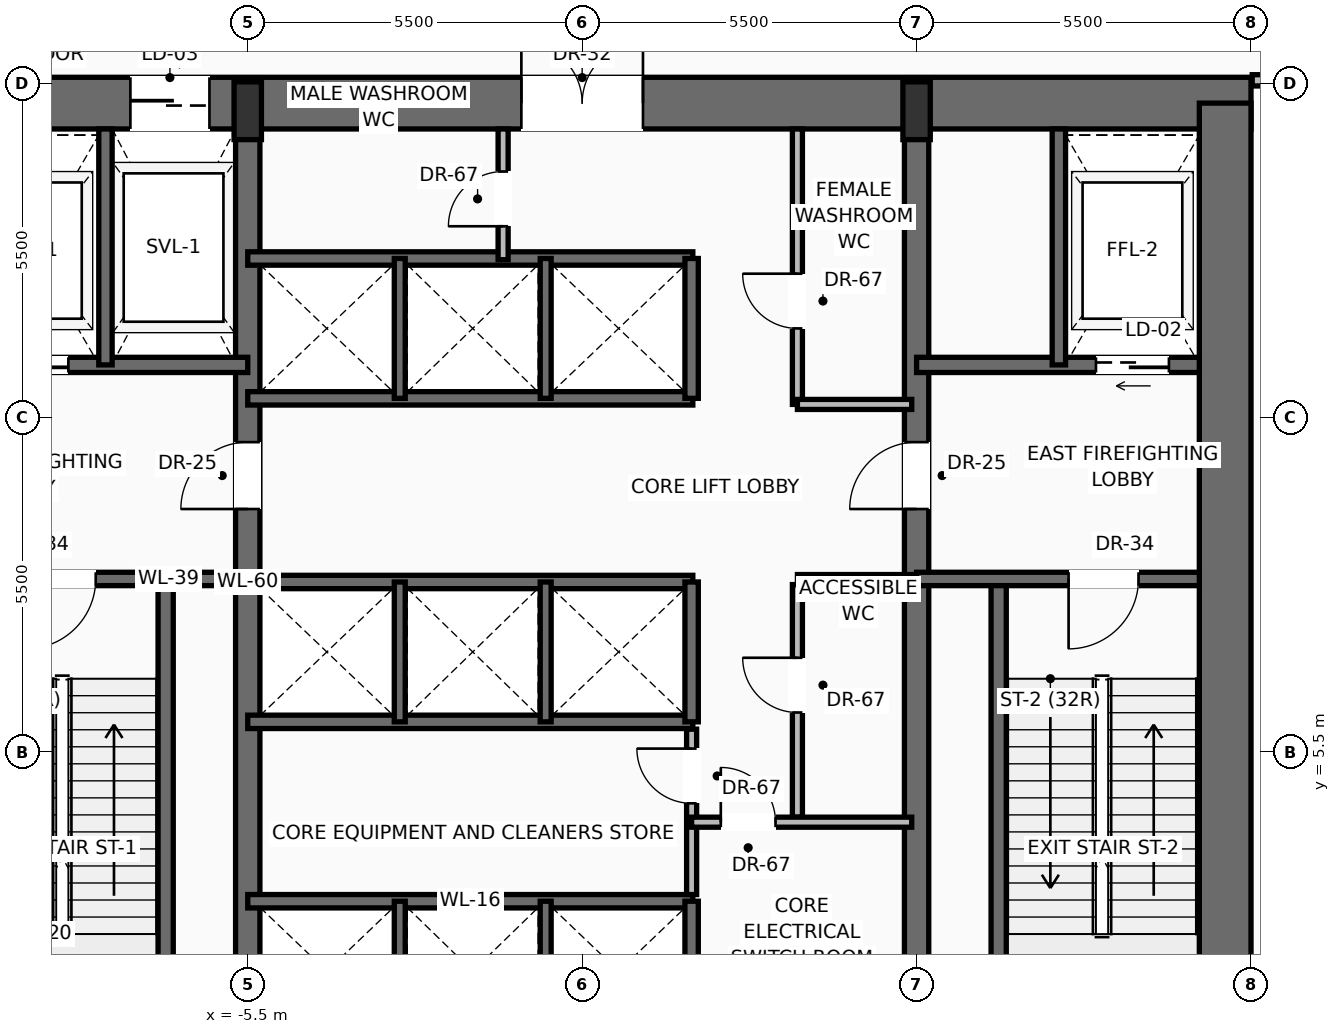
"""IFC4 building model, lengths in metres.
Left out: names, types, materials, properties, quantities, classifications, styles, units other than length and angle.
Written with IfcOpenShell. Run it as: python <this file> out.ifc"""

import sys

from ifc_helpers import new_model, si_unit, direction, frame, frame_2d, origin, origin_2d, place, context, subcontext, project, spatial, rectangle, extrude, source, transform, mapped, element, fill, save


model = new_model("IFC4")
c1 = context("Model", 3, precision=1e-05, world=origin(), true_north=direction((0.0, 1.0)))
c2 = subcontext(c1, "Body", "Model", "MODEL_VIEW")
j1 = project(units=[si_unit("LENGTHUNIT", "METRE"), si_unit("PLANEANGLEUNIT", "RADIAN")], contexts=[c1])
p1 = place(None, origin())
s1 = spatial("IfcSite", under=j1, at=p1, CompositionType="ELEMENT")
p2 = place(p1, origin())
s2 = spatial("IfcBuilding", under=s1, at=p2, CompositionType="ELEMENT")
p3 = place(p2, frame((0.0, 0.0, 16.5)))
s3 = spatial("IfcBuildingStorey", under=s2, at=p3, CompositionType="ELEMENT", Elevation=16.5)
p4 = place(p3, frame((-11.0, 16.175, 0.0), z_axis=(0.0, 0.0, 1.0), x_axis=(1.0, 0.0, 0.0)))
e1 = element("IfcWall", 1, at=p4, inside=s3, PredefinedType="SHEAR", context=c2, shape_type="SweptSolid", body=[
    extrude(rectangle(XDim=22.0, YDim=0.85, at=frame_2d((11.0, 0.0))), origin(), (0.0, 0.0, 1.0), 5.05),
])
p5 = place(p4, frame((3.57, 0.0, 0.0)))
e2 = element("IfcOpeningElement", 2, at=p5, cuts=e1, PredefinedType="OPENING", context=c2, shape_type="SweptSolid", body=[
    extrude(rectangle(XDim=1.3, YDim=2.3, at=frame_2d((0.65, 1.15))), frame((0.0, 0.435, 0.0), z_axis=(0.0, -1.0, 0.0), x_axis=(1.0, 0.0, 0.0)), (0.0, 0.0, 1.0), 0.87),
])
p6 = place(p4, frame((10.0, 0.0, 0.0)))
e3 = element("IfcOpeningElement", 3, at=p6, cuts=e1, PredefinedType="OPENING", context=c2, shape_type="SweptSolid", body=[
    extrude(rectangle(XDim=2.0, YDim=2.4, at=frame_2d((1.0, 1.2))), frame((0.0, 0.435, 0.0), z_axis=(0.0, -1.0, 0.0), x_axis=(1.0, 0.0, 0.0)), (0.0, 0.0, 1.0), 0.87),
])
p7 = place(p3, frame((10.575, 0.425, 0.0), z_axis=(0.0, 0.0, 1.0), x_axis=(0.0, 1.0, 0.0)))
e4 = element("IfcWall", 4, at=p7, inside=s3, PredefinedType="SHEAR", context=c2, shape_type="SweptSolid", body=[
    extrude(rectangle(XDim=15.75, YDim=0.85, at=frame_2d((7.875, 0.0))), origin(), (0.0, 0.0, 1.0), 5.05),
])
p8 = place(p3, frame((-5.5, 0.425, 0.0), z_axis=(0.0, 0.0, 1.0), x_axis=(0.0, 1.0, 0.0)))
e5 = element("IfcWall", 5, at=p8, inside=s3, PredefinedType="SHEAR", context=c2, shape_type="SweptSolid", body=[
    extrude(rectangle(XDim=15.75, YDim=0.4, at=frame_2d((7.875, 0.0))), origin(), (0.0, 0.0, 1.0), 5.05),
])
p9 = place(p8, frame((9.075, 0.0, 0.0)))
e6 = element("IfcOpeningElement", 6, at=p9, cuts=e5, PredefinedType="OPENING", context=c2, shape_type="SweptSolid", body=[
    extrude(rectangle(XDim=1.1, YDim=2.2, at=frame_2d((0.55, 1.1))), frame((0.0, 0.21, 0.0), z_axis=(0.0, -1.0, 0.0), x_axis=(1.0, 0.0, 0.0)), (0.0, 0.0, 1.0), 0.42),
])
p10 = place(p3, frame((5.5, 0.425, 0.0), z_axis=(0.0, 0.0, 1.0), x_axis=(0.0, 1.0, 0.0)))
e7 = element("IfcWall", 7, at=p10, inside=s3, PredefinedType="SHEAR", context=c2, shape_type="SweptSolid", body=[
    extrude(rectangle(XDim=15.75, YDim=0.4, at=frame_2d((7.875, 0.0))), origin(), (0.0, 0.0, 1.0), 5.05),
])
p11 = place(p10, frame((9.075, 0.0, 0.0)))
e8 = element("IfcOpeningElement", 8, at=p11, cuts=e7, PredefinedType="OPENING", context=c2, shape_type="SweptSolid", body=[
    extrude(rectangle(XDim=1.1, YDim=2.2, at=frame_2d((0.55, 1.1))), frame((0.0, 0.21, 0.0), z_axis=(0.0, -1.0, 0.0), x_axis=(1.0, 0.0, 0.0)), (0.0, 0.0, 1.0), 0.42),
])
m1 = source(origin(), c2, "Body", "SweptSolid", [
    extrude(rectangle(XDim=0.45, YDim=0.95, at=origin_2d()), origin(), (0.0, 0.0, 1.0), 5.5),
])
for number, where, z_axis, x_axis in (
    (9, (-5.5, 16.05, 0.0), (0.0, 0.0, 1.0), (1.0, 0.0, 0.0)),
    (10, (5.5, 16.05, 0.0), (0.0, 0.0, 1.0), (1.0, 0.0, 0.0)),
):
    element("IfcColumn", number, at=place(p3, frame(where, z_axis=z_axis, x_axis=x_axis)), inside=s3, PredefinedType="PILASTER", context=c2, shape_type="MappedRepresentation", body=[
        mapped(m1, transform((0.0, 0.0, 0.0), scale=1.0)),
    ])
p12 = place(p3, frame((-6.85, 0.85, 0.0), z_axis=(0.0, 0.0, 1.0), x_axis=(0.0, 1.0, 0.0)))
e11 = element("IfcWall", 11, at=p12, inside=s3, PredefinedType="SOLIDWALL", context=c2, shape_type="SweptSolid", body=[
    extrude(rectangle(XDim=7.5, YDim=0.25, at=frame_2d((3.75, 0.0))), origin(), (0.0, 0.0, 1.0), 5.05),
])
p13 = place(p3, frame((-5.5, 8.35, 0.0), z_axis=(0.0, 0.0, 1.0), x_axis=(-1.0, 0.0, 0.0)))
e12 = element("IfcWall", 12, at=p13, inside=s3, PredefinedType="SOLIDWALL", context=c2, shape_type="SweptSolid", body=[
    extrude(rectangle(XDim=4.65, YDim=0.22, at=frame_2d((2.325, 0.0))), origin(), (0.0, 0.0, 1.0), 5.05),
])
p14 = place(p13, frame((2.5, 0.0, 0.0)))
e13 = element("IfcOpeningElement", 13, at=p14, cuts=e12, PredefinedType="OPENING", context=c2, shape_type="SweptSolid", body=[
    extrude(rectangle(XDim=1.15, YDim=2.2, at=frame_2d((0.575, 1.1))), frame((0.0, 0.12, 0.0), z_axis=(0.0, -1.0, 0.0), x_axis=(1.0, 0.0, 0.0)), (0.0, 0.0, 1.0), 0.24),
])
p15 = place(p3, frame((-5.5, 11.87, 0.0), z_axis=(0.0, 0.0, 1.0), x_axis=(-1.0, 0.0, 0.0)))
e14 = element("IfcWall", 14, at=p15, inside=s3, PredefinedType="SOLIDWALL", context=c2, shape_type="SweptSolid", body=[
    extrude(rectangle(XDim=4.65, YDim=0.25, at=frame_2d((2.325, 0.0))), origin(), (0.0, 0.0, 1.0), 5.05),
])
p16 = place(p15, frame((2.95, 0.0, 0.0)))
e15 = element("IfcOpeningElement", 15, at=p16, cuts=e14, PredefinedType="OPENING", context=c2, shape_type="SweptSolid", body=[
    extrude(rectangle(XDim=1.2, YDim=2.25, at=frame_2d((0.6, 1.125))), frame((0.0, 0.135, 0.0), z_axis=(0.0, -1.0, 0.0), x_axis=(1.0, 0.0, 0.0)), (0.0, 0.0, 1.0), 0.27),
])
p17 = place(p3, frame((-7.84, 11.87, 0.0), z_axis=(0.0, 0.0, 1.0), x_axis=(0.0, 1.0, 0.0)))
e16 = element("IfcWall", 16, at=p17, inside=s3, PredefinedType="SOLIDWALL", context=c2, shape_type="SweptSolid", body=[
    extrude(rectangle(XDim=3.88, YDim=0.22, at=frame_2d((1.94, 0.0))), origin(), (0.0, 0.0, 1.0), 5.05),
])
p18 = place(p3, frame((6.85, 0.85, 0.0), z_axis=(0.0, 0.0, 1.0), x_axis=(0.0, 1.0, 0.0)))
e17 = element("IfcWall", 17, at=p18, inside=s3, PredefinedType="SOLIDWALL", context=c2, shape_type="SweptSolid", body=[
    extrude(rectangle(XDim=7.5, YDim=0.25, at=frame_2d((3.75, 0.0))), origin(), (0.0, 0.0, 1.0), 5.05),
])
p19 = place(p3, frame((10.15, 8.35, 0.0), z_axis=(0.0, 0.0, 1.0), x_axis=(-1.0, 0.0, 0.0)))
e18 = element("IfcWall", 18, at=p19, inside=s3, PredefinedType="SOLIDWALL", context=c2, shape_type="SweptSolid", body=[
    extrude(rectangle(XDim=4.65, YDim=0.22, at=frame_2d((2.325, 0.0))), origin(), (0.0, 0.0, 1.0), 5.05),
])
p20 = place(p19, frame((1.0, 0.0, 0.0)))
e19 = element("IfcOpeningElement", 19, at=p20, cuts=e18, PredefinedType="OPENING", context=c2, shape_type="SweptSolid", body=[
    extrude(rectangle(XDim=1.15, YDim=2.2, at=frame_2d((0.575, 1.1))), frame((0.0, 0.12, 0.0), z_axis=(0.0, -1.0, 0.0), x_axis=(1.0, 0.0, 0.0)), (0.0, 0.0, 1.0), 0.24),
])
p21 = place(p3, frame((10.15, 11.87, 0.0), z_axis=(0.0, 0.0, 1.0), x_axis=(-1.0, 0.0, 0.0)))
e20 = element("IfcWall", 20, at=p21, inside=s3, PredefinedType="SOLIDWALL", context=c2, shape_type="SweptSolid", body=[
    extrude(rectangle(XDim=4.65, YDim=0.25, at=frame_2d((2.325, 0.0))), origin(), (0.0, 0.0, 1.0), 5.05),
])
p22 = place(p21, frame((0.5, 0.0, 0.0)))
e21 = element("IfcOpeningElement", 21, at=p22, cuts=e20, PredefinedType="OPENING", context=c2, shape_type="SweptSolid", body=[
    extrude(rectangle(XDim=1.2, YDim=2.25, at=frame_2d((0.6, 1.125))), frame((0.0, 0.135, 0.0), z_axis=(0.0, -1.0, 0.0), x_axis=(1.0, 0.0, 0.0)), (0.0, 0.0, 1.0), 0.27),
])
p23 = place(p3, frame((7.84, 11.87, 0.0), z_axis=(0.0, 0.0, 1.0), x_axis=(0.0, 1.0, 0.0)))
e22 = element("IfcWall", 22, at=p23, inside=s3, PredefinedType="SOLIDWALL", context=c2, shape_type="SweptSolid", body=[
    extrude(rectangle(XDim=3.88, YDim=0.22, at=frame_2d((1.94, 0.0))), origin(), (0.0, 0.0, 1.0), 5.05),
])
p24 = place(p3, frame((-5.5, 3.05, 0.0), z_axis=(0.0, 0.0, 1.0), x_axis=(1.0, 0.0, 0.0)))
e23 = element("IfcWall", 23, at=p24, inside=s3, PredefinedType="SOLIDWALL", context=c2, shape_type="SweptSolid", body=[
    extrude(rectangle(XDim=7.32, YDim=0.22, at=frame_2d((3.66, 0.0))), origin(), (0.0, 0.0, 1.0), 5.05),
])
p25 = place(p3, frame((1.8, 0.85, 0.0), z_axis=(0.0, 0.0, 1.0), x_axis=(0.0, 1.0, 0.0)))
e24 = element("IfcWall", 24, at=p25, inside=s3, PredefinedType="SOLIDWALL", context=c2, shape_type="SweptSolid", body=[
    extrude(rectangle(XDim=2.2, YDim=0.22, at=frame_2d((1.1, 0.0))), origin(), (0.0, 0.0, 1.0), 5.05),
])
for number, where, z_axis, x_axis in (
    (25, (-3.0, 0.85, 0.0), (0.0, 0.0, 1.0), (0.0, 1.0, 0.0)),
    (26, (-0.6, 0.85, 0.0), (0.0, 0.0, 1.0), (0.0, 1.0, 0.0)),
):
    element("IfcWall", number, at=place(p3, frame(where, z_axis=z_axis, x_axis=x_axis)), inside=s3, PredefinedType="SOLIDWALL", context=c2, shape_type="SweptSolid", body=[
        extrude(rectangle(XDim=2.2, YDim=0.18, at=frame_2d((1.1, 0.0))), origin(), (0.0, 0.0, 1.0), 5.05),
    ])
p26 = place(p3, frame((1.8, 3.16, 0.0), z_axis=(0.0, 0.0, 1.0), x_axis=(0.0, 1.0, 0.0)))
e27 = element("IfcWall", 27, at=p26, inside=s3, PredefinedType="PARTITIONING", context=c2, shape_type="SweptSolid", body=[
    extrude(rectangle(XDim=2.72, YDim=0.165, at=frame_2d((1.36, 0.0))), origin(), (0.0, 0.0, 1.0), 5.042),
])
p27 = place(p26, frame((1.5, 0.0, 0.0)))
e28 = element("IfcOpeningElement", 28, at=p27, cuts=e27, PredefinedType="OPENING", context=c2, shape_type="SweptSolid", body=[
    extrude(rectangle(XDim=0.9, YDim=2.1, at=frame_2d((0.45, 1.05))), frame((0.0, 0.093, 0.0), z_axis=(0.0, -1.0, 0.0), x_axis=(1.0, 0.0, 0.0)), (0.0, 0.0, 1.0), 0.185),
])
p28 = place(p3, frame((3.54, 4.433, 0.0), z_axis=(0.0, 0.0, 1.0), x_axis=(0.0, 1.0, 0.0)))
e29 = element("IfcWall", 29, at=p28, inside=s3, PredefinedType="PARTITIONING", context=c2, shape_type="SweptSolid", body=[
    extrude(rectangle(XDim=3.825, YDim=0.165, at=frame_2d((1.913, 0.0))), origin(), (0.0, 0.0, 1.0), 5.042),
])
p29 = place(p28, frame((1.721, 0.0, 0.0)))
e30 = element("IfcOpeningElement", 30, at=p29, cuts=e29, PredefinedType="OPENING", context=c2, shape_type="SweptSolid", body=[
    extrude(rectangle(XDim=0.9, YDim=2.1, at=frame_2d((0.45, 1.05))), frame((0.0, 0.093, 0.0), z_axis=(0.0, -1.0, 0.0), x_axis=(1.0, 0.0, 0.0)), (0.0, 0.0, 1.0), 0.185),
])
p30 = place(p3, frame((3.54, 8.34, 0.0), z_axis=(0.0, 0.0, 1.0), x_axis=(1.0, 0.0, 0.0)))
e31 = element("IfcWall", 31, at=p30, inside=s3, PredefinedType="PARTITIONING", context=c2, shape_type="SweptSolid", body=[
    extrude(rectangle(XDim=1.88, YDim=0.165, at=frame_2d((0.94, 0.0))), origin(), (0.0, 0.0, 1.0), 5.042),
])
p31 = place(p3, frame((1.8, 4.35, 0.0), z_axis=(0.0, 0.0, 1.0), x_axis=(1.0, 0.0, 0.0)))
e32 = element("IfcWall", 32, at=p31, inside=s3, PredefinedType="PARTITIONING", context=c2, shape_type="SweptSolid", body=[
    extrude(rectangle(XDim=3.62, YDim=0.165, at=frame_2d((1.81, 0.0))), origin(), (0.0, 0.0, 1.0), 5.042),
])
p32 = place(p31, frame((0.48, 0.0, 0.0)))
e33 = element("IfcOpeningElement", 33, at=p32, cuts=e32, PredefinedType="OPENING", context=c2, shape_type="SweptSolid", body=[
    extrude(rectangle(XDim=0.9, YDim=2.1, at=frame_2d((0.45, 1.05))), frame((0.0, 0.093, 0.0), z_axis=(0.0, -1.0, 0.0), x_axis=(1.0, 0.0, 0.0)), (0.0, 0.0, 1.0), 0.185),
])
for number, where, z_axis, x_axis in (
    (34, (-5.5, 6.0, 0.0), (0.0, 0.0, 1.0), (1.0, 0.0, 0.0)),
    (35, (-5.5, 8.3, 0.0), (0.0, 0.0, 1.0), (1.0, 0.0, 0.0)),
):
    element("IfcWall", number, at=place(p3, frame(where, z_axis=z_axis, x_axis=x_axis)), inside=s3, PredefinedType="SOLIDWALL", context=c2, shape_type="SweptSolid", body=[
        extrude(rectangle(XDim=7.32, YDim=0.22, at=frame_2d((3.66, 0.0))), origin(), (0.0, 0.0, 1.0), 5.05),
    ])
p33 = place(p3, frame((1.8, 6.0, 0.0), z_axis=(0.0, 0.0, 1.0), x_axis=(0.0, 1.0, 0.0)))
e36 = element("IfcWall", 36, at=p33, inside=s3, PredefinedType="SOLIDWALL", context=c2, shape_type="SweptSolid", body=[
    extrude(rectangle(XDim=2.3, YDim=0.22, at=frame_2d((1.15, 0.0))), origin(), (0.0, 0.0, 1.0), 5.05),
])
for number, where, z_axis, x_axis in (
    (37, (-3.0, 6.0, 0.0), (0.0, 0.0, 1.0), (0.0, 1.0, 0.0)),
    (38, (-0.6, 6.0, 0.0), (0.0, 0.0, 1.0), (0.0, 1.0, 0.0)),
):
    element("IfcWall", number, at=place(p3, frame(where, z_axis=z_axis, x_axis=x_axis)), inside=s3, PredefinedType="SOLIDWALL", context=c2, shape_type="SweptSolid", body=[
        extrude(rectangle(XDim=2.3, YDim=0.18, at=frame_2d((1.15, 0.0))), origin(), (0.0, 0.0, 1.0), 5.05),
    ])
for number, where, z_axis, x_axis in (
    (39, (-5.5, 11.32, 0.0), (0.0, 0.0, 1.0), (1.0, 0.0, 0.0)),
    (40, (-5.5, 13.62, 0.0), (0.0, 0.0, 1.0), (1.0, 0.0, 0.0)),
):
    element("IfcWall", number, at=place(p3, frame(where, z_axis=z_axis, x_axis=x_axis)), inside=s3, PredefinedType="SOLIDWALL", context=c2, shape_type="SweptSolid", body=[
        extrude(rectangle(XDim=7.32, YDim=0.22, at=frame_2d((3.66, 0.0))), origin(), (0.0, 0.0, 1.0), 5.05),
    ])
p34 = place(p3, frame((1.8, 11.32, 0.0), z_axis=(0.0, 0.0, 1.0), x_axis=(0.0, 1.0, 0.0)))
e41 = element("IfcWall", 41, at=p34, inside=s3, PredefinedType="SOLIDWALL", context=c2, shape_type="SweptSolid", body=[
    extrude(rectangle(XDim=2.3, YDim=0.22, at=frame_2d((1.15, 0.0))), origin(), (0.0, 0.0, 1.0), 5.05),
])
for number, where, z_axis, x_axis in (
    (42, (-3.0, 11.32, 0.0), (0.0, 0.0, 1.0), (0.0, 1.0, 0.0)),
    (43, (-0.6, 11.32, 0.0), (0.0, 0.0, 1.0), (0.0, 1.0, 0.0)),
):
    element("IfcWall", number, at=place(p3, frame(where, z_axis=z_axis, x_axis=x_axis)), inside=s3, PredefinedType="SOLIDWALL", context=c2, shape_type="SweptSolid", body=[
        extrude(rectangle(XDim=2.3, YDim=0.18, at=frame_2d((1.15, 0.0))), origin(), (0.0, 0.0, 1.0), 5.05),
    ])
p35 = place(p3, frame((-1.3, 13.6, 0.0), z_axis=(0.0, 0.0, 1.0), x_axis=(0.0, 1.0, 0.0)))
e44 = element("IfcWall", 44, at=p35, inside=s3, PredefinedType="PARTITIONING", context=c2, shape_type="SweptSolid", body=[
    extrude(rectangle(XDim=2.15, YDim=0.165, at=frame_2d((1.075, 0.0))), origin(), (0.0, 0.0, 1.0), 5.042),
])
p36 = place(p35, frame((0.55, 0.0, 0.0)))
e45 = element("IfcOpeningElement", 45, at=p36, cuts=e44, PredefinedType="OPENING", context=c2, shape_type="SweptSolid", body=[
    extrude(rectangle(XDim=0.9, YDim=2.1, at=frame_2d((0.45, 1.05))), frame((0.0, 0.093, 0.0), z_axis=(0.0, -1.0, 0.0), x_axis=(1.0, 0.0, 0.0)), (0.0, 0.0, 1.0), 0.185),
])
p37 = place(p3, frame((3.54, 11.22, 0.0), z_axis=(0.0, 0.0, 1.0), x_axis=(0.0, 1.0, 0.0)))
e46 = element("IfcWall", 46, at=p37, inside=s3, PredefinedType="PARTITIONING", context=c2, shape_type="SweptSolid", body=[
    extrude(rectangle(XDim=4.53, YDim=0.165, at=frame_2d((2.265, 0.0))), origin(), (0.0, 0.0, 1.0), 5.042),
])
p38 = place(p37, frame((1.25, 0.0, 0.0)))
e47 = element("IfcOpeningElement", 47, at=p38, cuts=e46, PredefinedType="OPENING", context=c2, shape_type="SweptSolid", body=[
    extrude(rectangle(XDim=0.9, YDim=2.1, at=frame_2d((0.45, 1.05))), frame((0.0, 0.093, 0.0), z_axis=(0.0, -1.0, 0.0), x_axis=(1.0, 0.0, 0.0)), (0.0, 0.0, 1.0), 0.185),
])
p39 = place(p3, frame((3.54, 11.22, 0.0), z_axis=(0.0, 0.0, 1.0), x_axis=(1.0, 0.0, 0.0)))
e48 = element("IfcWall", 48, at=p39, inside=s3, PredefinedType="PARTITIONING", context=c2, shape_type="SweptSolid", body=[
    extrude(rectangle(XDim=1.88, YDim=0.165, at=frame_2d((0.94, 0.0))), origin(), (0.0, 0.0, 1.0), 5.042),
])
p40 = place(p3, frame((11.02, 16.55, 0.0), z_axis=(0.0, 0.0, 1.0), x_axis=(1.0, 0.0, 0.0)))
e49 = element("IfcWall", 49, at=p40, inside=s3, PredefinedType="PARTITIONING", context=c2, shape_type="SweptSolid", body=[
    extrude(rectangle(XDim=11.48, YDim=0.185, at=frame_2d((5.74, 0.0))), origin(), (0.0, 0.0, 1.0), 4.002),
])
p41 = place(p40, frame((5.265, 0.0, 0.0)))
e50 = element("IfcOpeningElement", 50, at=p41, cuts=e49, PredefinedType="OPENING", context=c2, shape_type="SweptSolid", body=[
    extrude(rectangle(XDim=0.95, YDim=2.2, at=frame_2d((0.475, 1.1))), frame((0.0, 0.103, 0.0), z_axis=(0.0, -1.0, 0.0), x_axis=(1.0, 0.0, 0.0)), (0.0, 0.0, 1.0), 0.205),
])
m2 = source(origin(), c2, "Body", "SweptSolid", [
    extrude(rectangle(XDim=1.15, YDim=2.2, at=frame_2d((0.575, 1.1))), frame((0.0, 0.025, 0.0), z_axis=(0.0, -1.0, 0.0), x_axis=(1.0, 0.0, 0.0)), (0.0, 0.0, 1.0), 0.05),
])
p42 = place(p14, origin())
e51 = element("IfcDoor", 51, at=p42, inside=s3, OperationType="SINGLE_SWING_RIGHT", PredefinedType="DOOR", context=c2, shape_type="MappedRepresentation", body=[
    mapped(m2, transform((0.0, 0.0, 0.0), scale=1.0)),
])
fill(e13, e51)
m3 = source(origin(), c2, "Body", "SweptSolid", [
    extrude(rectangle(XDim=1.1, YDim=2.2, at=frame_2d((0.55, 1.1))), frame((0.0, 0.025, 0.0), z_axis=(0.0, -1.0, 0.0), x_axis=(1.0, 0.0, 0.0)), (0.0, 0.0, 1.0), 0.05),
])
p43 = place(p9, origin())
e52 = element("IfcDoor", 52, at=p43, inside=s3, OperationType="SINGLE_SWING_LEFT", PredefinedType="DOOR", context=c2, shape_type="MappedRepresentation", body=[
    mapped(m3, transform((0.0, 0.0, 0.0), scale=1.0)),
])
fill(e6, e52)
m4 = source(origin(), c2, "Body", "SweptSolid", [
    extrude(rectangle(XDim=1.2, YDim=2.25, at=frame_2d((0.6, 1.125))), frame((0.0, 0.025, 0.0), z_axis=(0.0, -1.0, 0.0), x_axis=(1.0, 0.0, 0.0)), (0.0, 0.0, 1.0), 0.05),
])
p44 = place(p16, origin())
e53 = element("IfcDoor", 53, at=p44, inside=s3, OperationType="SLIDING_TO_LEFT", PredefinedType="DOOR", context=c2, shape_type="MappedRepresentation", body=[
    mapped(m4, transform((0.0, 0.0, 0.0), scale=1.0)),
])
fill(e15, e53)
m5 = source(origin(), c2, "Body", "SweptSolid", [
    extrude(rectangle(XDim=1.3, YDim=2.3, at=frame_2d((0.65, 1.15))), frame((0.0, 0.025, 0.0), z_axis=(0.0, -1.0, 0.0), x_axis=(1.0, 0.0, 0.0)), (0.0, 0.0, 1.0), 0.05),
])
p45 = place(p5, origin())
e54 = element("IfcDoor", 54, at=p45, inside=s3, OperationType="SLIDING_TO_RIGHT", PredefinedType="DOOR", context=c2, shape_type="MappedRepresentation", body=[
    mapped(m5, transform((0.0, 0.0, 0.0), scale=1.0)),
])
fill(e2, e54)
p46 = place(p20, origin())
e55 = element("IfcDoor", 55, at=p46, inside=s3, OperationType="SINGLE_SWING_RIGHT", PredefinedType="DOOR", context=c2, shape_type="MappedRepresentation", body=[
    mapped(m2, transform((0.0, 0.0, 0.0), scale=1.0)),
])
fill(e19, e55)
p47 = place(p11, origin())
e56 = element("IfcDoor", 56, at=p47, inside=s3, OperationType="SINGLE_SWING_LEFT", PredefinedType="DOOR", context=c2, shape_type="MappedRepresentation", body=[
    mapped(m3, transform((0.0, 0.0, 0.0), scale=1.0)),
])
fill(e8, e56)
p48 = place(p22, origin())
e57 = element("IfcDoor", 57, at=p48, inside=s3, OperationType="SLIDING_TO_RIGHT", PredefinedType="DOOR", context=c2, shape_type="MappedRepresentation", body=[
    mapped(m4, transform((0.0, 0.0, 0.0), scale=1.0)),
])
fill(e21, e57)
m6 = source(origin(), c2, "Body", "SweptSolid", [
    extrude(rectangle(XDim=2.0, YDim=2.4, at=frame_2d((1.0, 1.2))), frame((0.0, 0.025, 0.0), z_axis=(0.0, -1.0, 0.0), x_axis=(1.0, 0.0, 0.0)), (0.0, 0.0, 1.0), 0.05),
])
p49 = place(p6, origin())
e58 = element("IfcDoor", 58, at=p49, inside=s3, OperationType="DOUBLE_DOOR_SINGLE_SWING", PredefinedType="DOOR", context=c2, shape_type="MappedRepresentation", body=[
    mapped(m6, transform((0.0, 0.0, 0.0), scale=1.0)),
])
fill(e3, e58)
m7 = source(origin(), c2, "Body", "SweptSolid", [
    extrude(rectangle(XDim=0.9, YDim=2.1, at=frame_2d((0.45, 1.05))), frame((0.0, 0.025, 0.0), z_axis=(0.0, -1.0, 0.0), x_axis=(1.0, 0.0, 0.0)), (0.0, 0.0, 1.0), 0.05),
])
p50 = place(p27, origin())
e59 = element("IfcDoor", 59, at=p50, inside=s3, OperationType="SINGLE_SWING_RIGHT", PredefinedType="DOOR", context=c2, shape_type="MappedRepresentation", body=[
    mapped(m7, transform((0.0, 0.0, 0.0), scale=1.0)),
])
fill(e28, e59)
p51 = place(p32, origin())
e60 = element("IfcDoor", 60, at=p51, inside=s3, OperationType="SINGLE_SWING_LEFT", PredefinedType="DOOR", context=c2, shape_type="MappedRepresentation", body=[
    mapped(m7, transform((0.0, 0.0, 0.0), scale=1.0)),
])
fill(e33, e60)
p52 = place(p29, origin())
e61 = element("IfcDoor", 61, at=p52, inside=s3, OperationType="SINGLE_SWING_RIGHT", PredefinedType="DOOR", context=c2, shape_type="MappedRepresentation", body=[
    mapped(m7, transform((0.0, 0.0, 0.0), scale=1.0)),
])
fill(e30, e61)
p53 = place(p36, origin())
e62 = element("IfcDoor", 62, at=p53, inside=s3, OperationType="SINGLE_SWING_LEFT", PredefinedType="DOOR", context=c2, shape_type="MappedRepresentation", body=[
    mapped(m7, transform((0.0, 0.0, 0.0), scale=1.0)),
])
fill(e45, e62)
p54 = place(p38, origin())
e63 = element("IfcDoor", 63, at=p54, inside=s3, OperationType="SINGLE_SWING_RIGHT", PredefinedType="DOOR", context=c2, shape_type="MappedRepresentation", body=[
    mapped(m7, transform((0.0, 0.0, 0.0), scale=1.0)),
])
fill(e47, e63)
save(model, sys.argv[1])
